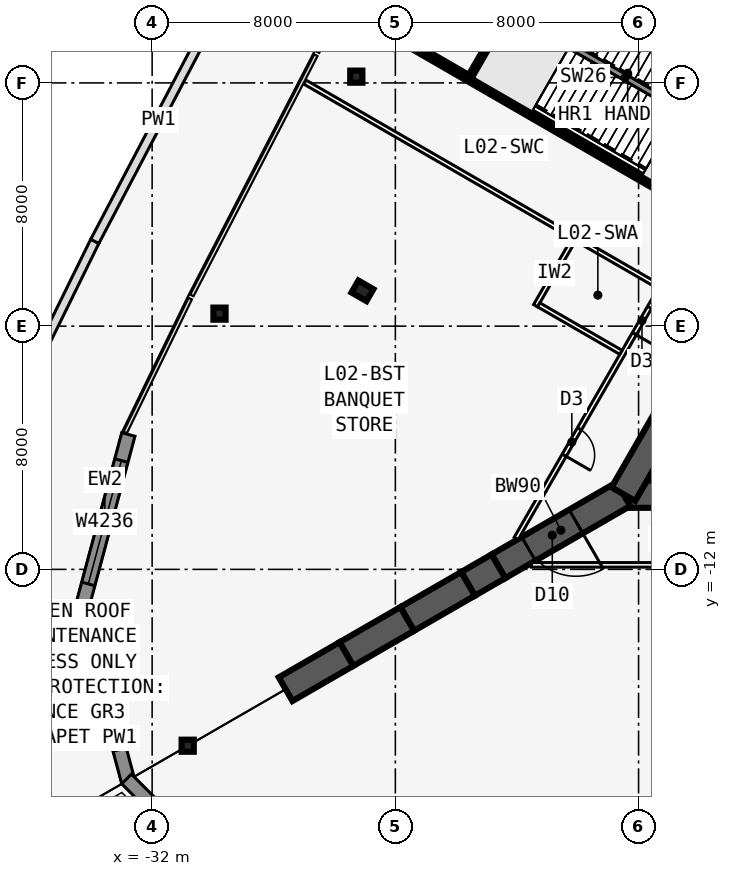
"""IFC4 building model, lengths in metres.
Left out: names, types, materials, properties, quantities, classifications, styles, units other than length and angle.
Written with IfcOpenShell. Run it as: python <this file> out.ifc"""

import sys

from ifc_helpers import new_model, si_unit, direction, frame, frame_2d, origin, origin_2d, place, context, subcontext, project, spatial, rectangle, i_section, extrude, element, fill, save


model = new_model("IFC4")
c1 = context("Model", 3, precision=1e-05, world=origin(), true_north=direction((0.0, 1.0)))
c2 = subcontext(c1, "Body", "Model", "MODEL_VIEW")
j1 = project(units=[si_unit("LENGTHUNIT", "METRE"), si_unit("PLANEANGLEUNIT", "RADIAN")], contexts=[c1])
p1 = place(None, origin())
s1 = spatial("IfcSite", under=j1, at=p1, CompositionType="ELEMENT")
p2 = place(p1, origin())
s2 = spatial("IfcBuilding", under=s1, at=p2, CompositionType="ELEMENT")
p3 = place(p2, frame((0.0, 0.0, 11.0)))
s3 = spatial("IfcBuildingStorey", under=s2, at=p3, CompositionType="ELEMENT", Elevation=11.0)
p4 = place(p3, frame((-16.5, -9.526, 0.0), z_axis=(0.0, 0.0, 1.0), x_axis=(1.0, 0.0, 0.0)))
e1 = element("IfcWall", 1, at=p4, inside=s3, PredefinedType="SHEAR", context=c2, shape_type="SweptSolid", body=[
    extrude(rectangle(XDim=33.0, YDim=0.9, at=frame_2d((16.5, 0.0))), origin(), (0.0, 0.0, 1.0), 6.5),
])
p5 = place(p4, frame((14.05, 0.0, 0.0)))
e2 = element("IfcOpeningElement", 2, at=p5, cuts=e1, PredefinedType="OPENING", context=c2, shape_type="SweptSolid", body=[
    extrude(rectangle(XDim=1.8, YDim=2.13, at=frame_2d((0.9, 1.065))), frame((0.0, 0.46, 0.0), z_axis=(0.0, -1.0, 0.0), x_axis=(1.0, 0.0, 0.0)), (0.0, 0.0, 1.0), 0.92),
])
p6 = place(p3, frame((0.0, 19.052, 0.0), z_axis=(0.0, 0.0, 1.0), x_axis=(-0.499999749417, -0.866025548458, 0.0)))
e3 = element("IfcWall", 3, at=p6, inside=s3, PredefinedType="SHEAR", context=c2, shape_type="SweptSolid", body=[
    extrude(rectangle(XDim=33.0, YDim=0.9, at=frame_2d((16.5, 0.0))), origin(), (0.0, 0.0, 1.0), 6.5),
])
p7 = place(p6, frame((14.15, 0.0, 0.0)))
e4 = element("IfcOpeningElement", 4, at=p7, cuts=e3, PredefinedType="OPENING", context=c2, shape_type="SweptSolid", body=[
    extrude(rectangle(XDim=1.8, YDim=2.13, at=frame_2d((0.9, 1.065))), frame((0.0, 0.46, 0.0), z_axis=(0.0, -1.0, 0.0), x_axis=(1.0, 0.0, 0.0)), (0.0, 0.0, 1.0), 0.92),
])
p8 = place(p6, frame((12.6, 0.0, 0.0)))
e5 = element("IfcOpeningElement", 5, at=p8, cuts=e3, PredefinedType="OPENING", context=c2, shape_type="SweptSolid", body=[
    extrude(rectangle(XDim=1.0, YDim=2.13, at=frame_2d((0.5, 1.065))), frame((0.0, 0.46, 0.0), z_axis=(0.0, -1.0, 0.0), x_axis=(1.0, 0.0, 0.0)), (0.0, 0.0, 1.0), 0.92),
])
p9 = place(p3, frame((-16.5, -9.526, 0.0), z_axis=(0.0, 0.0, 1.0), x_axis=(-0.866031398331, -0.499989616998, 0.0)))
e6 = element("IfcWall", 6, at=p9, inside=s3, PredefinedType="SHEAR", context=c2, shape_type="SweptSolid", body=[
    extrude(rectangle(XDim=4.746, YDim=0.9, at=frame_2d((2.373, 0.0))), origin(), (0.0, 0.0, 1.0), 6.5),
])
p10 = place(p9, frame((1.8, 0.0, 0.0)))
e7 = element("IfcOpeningElement", 7, at=p10, cuts=e6, PredefinedType="OPENING", context=c2, shape_type="SweptSolid", body=[
    extrude(rectangle(XDim=1.8, YDim=2.13, at=frame_2d((0.9, 1.065))), frame((0.0, 0.46, 0.0), z_axis=(0.0, -1.0, 0.0), x_axis=(1.0, 0.0, 0.0)), (0.0, 0.0, 1.0), 0.92),
])
p11 = place(p3, frame((-20.61, -11.899, 0.0), z_axis=(0.0, 0.0, 1.0), x_axis=(-0.866009537788, -0.500027479704, 0.0)))
e8 = element("IfcWall", 8, at=p11, inside=s3, PredefinedType="SHEAR", context=c2, shape_type="SweptSolid", body=[
    extrude(rectangle(XDim=1.155, YDim=0.9, at=frame_2d((0.577, 0.0))), origin(), (0.0, 0.0, 1.0), 6.5),
])
for number, where, z_axis, x_axis in (
    (9, (-21.61, -12.477, 0.0), (0.0, 0.0, 1.0), (-0.866, -0.5, 0.0)),
    (10, (-23.61, -13.631, 0.0), (0.0, 0.0, 1.0), (-0.866, -0.5, 0.0)),
    (11, (-25.61, -14.786, 0.0), (0.0, 0.0, 1.0), (-0.866, -0.5, 0.0)),
):
    element("IfcWall", number, at=place(p3, frame(where, z_axis=z_axis, x_axis=x_axis)), inside=s3, PredefinedType="SHEAR", context=c2, shape_type="SweptSolid", body=[
        extrude(rectangle(XDim=2.309, YDim=0.9, at=frame_2d((1.155, 0.0))), origin(), (0.0, 0.0, 1.0), 6.5),
    ])
p12 = place(p3, frame((-25.083, -2.839, 0.0), z_axis=(0.0, 0.0, 1.0), x_axis=(-0.5, -0.866025403784, 0.0)))
e12 = element("IfcColumn", 12, at=p12, inside=s3, PredefinedType="COLUMN", context=c2, shape_type="SweptSolid", body=[
    extrude(i_section(OverallWidth=0.455, OverallDepth=0.569, WebThickness=0.078, FlangeThickness=0.125, at=origin_2d()), origin(), (0.0, 0.0, 1.0), 6.5),
])
for number, where, z_axis, x_axis in (
    (13, (-30.831, -17.8, 0.0), (0.0, 0.0, 1.0), (1.0, 0.0, 0.0)),
    (14, (-29.785, -3.588, 0.0), (0.0, 0.0, 1.0), (1.0, 0.0, 0.0)),
    (15, (-25.285, 4.206, 0.0), (0.0, 0.0, 1.0), (1.0, 0.0, 0.0)),
):
    element("IfcColumn", number, at=place(p3, frame(where, z_axis=z_axis, x_axis=x_axis)), inside=s3, PredefinedType="COLUMN", context=c2, shape_type="SweptSolid", body=[
        extrude(i_section(OverallWidth=0.401, OverallDepth=0.399, WebThickness=0.025, FlangeThickness=0.04, at=origin_2d()), origin(), (0.0, 0.0, 1.0), 6.5),
    ])
p13 = place(p3, frame((-32.783, -7.564, 0.0), z_axis=(0.0, 0.0, 1.0), x_axis=(-0.258791208569, -0.965933284636, 0.0)))
e16 = element("IfcWall", 16, at=p13, inside=s3, PredefinedType="SOLIDWALL", context=c2, shape_type="SweptSolid", body=[
    extrude(rectangle(XDim=5.977, YDim=0.45, at=frame_2d((2.989, 0.0))), origin(), (0.0, 0.0, 1.0), 6.25),
])
p14 = place(p13, frame((0.889, 0.0, 1.2)))
e17 = element("IfcOpeningElement", 17, at=p14, cuts=e16, PredefinedType="OPENING", context=c2, shape_type="SweptSolid", body=[
    extrude(rectangle(XDim=4.2, YDim=3.6, at=frame_2d((2.1, 1.8))), frame((0.0, 0.235, 0.0), z_axis=(0.0, -1.0, 0.0), x_axis=(1.0, 0.0, 0.0)), (0.0, 0.0, 1.0), 0.47),
])
p15 = place(p3, frame((-34.33, -13.221, 0.0), z_axis=(0.0, 0.0, 1.0), x_axis=(0.258801419081, -0.965930548995, 0.0)))
e18 = element("IfcWall", 18, at=p15, inside=s3, PredefinedType="SOLIDWALL", context=c2, shape_type="SweptSolid", body=[
    extrude(rectangle(XDim=5.977, YDim=0.45, at=frame_2d((2.989, 0.0))), origin(), (0.0, 0.0, 1.0), 6.25),
])
p16 = place(p15, frame((0.67, 0.0, 1.2)))
e19 = element("IfcOpeningElement", 19, at=p16, cuts=e18, PredefinedType="OPENING", context=c2, shape_type="SweptSolid", body=[
    extrude(rectangle(XDim=4.2, YDim=3.6, at=frame_2d((2.1, 1.8))), frame((0.0, 0.235, 0.0), z_axis=(0.0, -1.0, 0.0), x_axis=(1.0, 0.0, 0.0)), (0.0, 0.0, 1.0), 0.47),
])
p17 = place(p3, frame((-32.841, -18.894, 0.0), z_axis=(0.0, 0.0, 1.0), x_axis=(0.707086357855, -0.707127203928, 0.0)))
e20 = element("IfcWall", 20, at=p17, inside=s3, PredefinedType="SOLIDWALL", context=c2, shape_type="SweptSolid", body=[
    extrude(rectangle(XDim=5.977, YDim=0.45, at=frame_2d((2.989, 0.0))), origin(), (0.0, 0.0, 1.0), 6.25),
])
p18 = place(p17, frame((1.107, 0.0, 1.2)))
e21 = element("IfcOpeningElement", 21, at=p18, cuts=e20, PredefinedType="OPENING", context=c2, shape_type="SweptSolid", body=[
    extrude(rectangle(XDim=4.2, YDim=3.6, at=frame_2d((2.1, 1.8))), frame((0.0, 0.235, 0.0), z_axis=(0.0, -1.0, 0.0), x_axis=(1.0, 0.0, 0.0)), (0.0, 0.0, 1.0), 0.47),
])
p19 = place(p3, frame((-37.859, -9.291, 0.0), z_axis=(0.0, 0.0, 1.0), x_axis=(0.441281352702, 0.897368802532, 0.0)))
e22 = element("IfcWall", 22, at=p19, inside=s3, PredefinedType="PARAPET", context=c2, shape_type="SweptSolid", body=[
    extrude(rectangle(XDim=9.003, YDim=0.3, at=frame_2d((4.501, 0.0))), origin(), (0.0, 0.0, 1.0), 1.1),
])
p20 = place(p3, frame((-33.886, -1.211, 0.0), z_axis=(0.0, 0.0, 1.0), x_axis=(0.46498853792, 0.885316700172, 0.0)))
e23 = element("IfcWall", 23, at=p20, inside=s3, PredefinedType="PARAPET", context=c2, shape_type="SweptSolid", body=[
    extrude(rectangle(XDim=9.003, YDim=0.3, at=frame_2d((4.502, 0.0))), origin(), (0.0, 0.0, 1.0), 1.1),
])
p21 = place(p3, frame((-19.527, -11.851, 0.0), z_axis=(0.0, 0.0, 1.0), x_axis=(1.0, 0.0, 0.0)))
e24 = element("IfcWall", 24, at=p21, inside=s3, PredefinedType="PARTITIONING", context=c2, shape_type="SweptSolid", body=[
    extrude(rectangle(XDim=39.054, YDim=0.15, at=frame_2d((19.527, 0.0))), origin(), (0.0, 0.0, 1.0), 5.308),
])
p22 = place(p21, frame((10.013, 0.0, 0.0)))
e25 = element("IfcOpeningElement", 25, at=p22, cuts=e24, PredefinedType="OPENING", context=c2, shape_type="SweptSolid", body=[
    extrude(rectangle(XDim=1.8, YDim=2.13, at=frame_2d((0.9, 1.065))), frame((0.0, 0.085, 0.0), z_axis=(0.0, -1.0, 0.0), x_axis=(1.0, 0.0, 0.0)), (0.0, 0.0, 1.0), 0.17),
])
p23 = place(p21, frame((23.227, 0.0, 0.0)))
e26 = element("IfcOpeningElement", 26, at=p23, cuts=e24, PredefinedType="OPENING", context=c2, shape_type="SweptSolid", body=[
    extrude(rectangle(XDim=1.8, YDim=2.13, at=frame_2d((0.9, 1.065))), frame((0.0, 0.085, 0.0), z_axis=(0.0, -1.0, 0.0), x_axis=(1.0, 0.0, 0.0)), (0.0, 0.0, 1.0), 0.17),
])
p24 = place(p21, frame((31.841, 0.0, 0.0)))
e27 = element("IfcOpeningElement", 27, at=p24, cuts=e24, PredefinedType="OPENING", context=c2, shape_type="SweptSolid", body=[
    extrude(rectangle(XDim=1.8, YDim=2.13, at=frame_2d((0.9, 1.065))), frame((0.0, 0.085, 0.0), z_axis=(0.0, -1.0, 0.0), x_axis=(1.0, 0.0, 0.0)), (0.0, 0.0, 1.0), 0.17),
])
p25 = place(p3, frame((-0.5, 22.836, 0.0), z_axis=(0.0, 0.0, 1.0), x_axis=(-0.500001677587, -0.866024435227, 0.0)))
e28 = element("IfcWall", 28, at=p25, inside=s3, PredefinedType="PARTITIONING", context=c2, shape_type="SweptSolid", body=[
    extrude(rectangle(XDim=39.054, YDim=0.15, at=frame_2d((19.527, 0.0))), origin(), (0.0, 0.0, 1.0), 5.308),
])
p26 = place(p25, frame((10.013, 0.0, 0.0)))
e29 = element("IfcOpeningElement", 29, at=p26, cuts=e28, PredefinedType="OPENING", context=c2, shape_type="SweptSolid", body=[
    extrude(rectangle(XDim=1.8, YDim=2.13, at=frame_2d((0.9, 1.065))), frame((0.0, 0.085, 0.0), z_axis=(0.0, -1.0, 0.0), x_axis=(1.0, 0.0, 0.0)), (0.0, 0.0, 1.0), 0.17),
])
p27 = place(p25, frame((23.227, 0.0, 0.0)))
e30 = element("IfcOpeningElement", 30, at=p27, cuts=e28, PredefinedType="OPENING", context=c2, shape_type="SweptSolid", body=[
    extrude(rectangle(XDim=1.8, YDim=2.13, at=frame_2d((0.9, 1.065))), frame((0.0, 0.085, 0.0), z_axis=(0.0, -1.0, 0.0), x_axis=(1.0, 0.0, 0.0)), (0.0, 0.0, 1.0), 0.17),
])
p28 = place(p25, frame((27.627, 0.0, 0.0)))
e31 = element("IfcOpeningElement", 31, at=p28, cuts=e28, PredefinedType="OPENING", context=c2, shape_type="SweptSolid", body=[
    extrude(rectangle(XDim=1.0, YDim=2.13, at=frame_2d((0.5, 1.065))), frame((0.0, 0.085, 0.0), z_axis=(0.0, -1.0, 0.0), x_axis=(1.0, 0.0, 0.0)), (0.0, 0.0, 1.0), 0.17),
])
p29 = place(p25, frame((30.277, 0.0, 0.0)))
e32 = element("IfcOpeningElement", 32, at=p29, cuts=e28, PredefinedType="OPENING", context=c2, shape_type="SweptSolid", body=[
    extrude(rectangle(XDim=1.0, YDim=2.13, at=frame_2d((0.5, 1.065))), frame((0.0, 0.085, 0.0), z_axis=(0.0, -1.0, 0.0), x_axis=(1.0, 0.0, 0.0)), (0.0, 0.0, 1.0), 0.17),
])
p30 = place(p25, frame((34.89, 0.0, 0.0)))
e33 = element("IfcOpeningElement", 33, at=p30, cuts=e28, PredefinedType="OPENING", context=c2, shape_type="SweptSolid", body=[
    extrude(rectangle(XDim=1.0, YDim=2.13, at=frame_2d((0.5, 1.065))), frame((0.0, 0.085, 0.0), z_axis=(0.0, -1.0, 0.0), x_axis=(1.0, 0.0, 0.0)), (0.0, 0.0, 1.0), 0.17),
])
p31 = place(p3, frame((-11.329, 4.231, 0.0), z_axis=(0.0, 0.0, 1.0), x_axis=(-0.866029620801, 0.499992695841, 0.0)))
e34 = element("IfcWall", 34, at=p31, inside=s3, PredefinedType="SHEAR", context=c2, shape_type="SweptSolid", body=[
    extrude(rectangle(XDim=13.607, YDim=0.2, at=frame_2d((6.804, 0.0))), origin(), (0.0, 0.0, 1.0), 6.5),
])
p32 = place(p3, frame((-13.928, -0.272, 0.0), z_axis=(0.0, 0.0, 1.0), x_axis=(-0.866022969634, 0.500004216049, 0.0)))
e35 = element("IfcWall", 35, at=p32, inside=s3, PredefinedType="SHEAR", context=c2, shape_type="SweptSolid", body=[
    extrude(rectangle(XDim=13.526, YDim=0.2, at=frame_2d((6.763, 0.0))), origin(), (0.0, 0.0, 1.0), 6.5),
])
p33 = place(p3, frame((-15.329, -2.697, 0.0), z_axis=(0.0, 0.0, 1.0), x_axis=(-0.866024753221, 0.500001126807, 0.0)))
e36 = element("IfcWall", 36, at=p33, inside=s3, PredefinedType="PARTITIONING", context=c2, shape_type="SweptSolid", body=[
    extrude(rectangle(XDim=13.448, YDim=0.15, at=frame_2d((6.724, 0.0))), origin(), (0.0, 0.0, 1.0), 5.308),
])
p34 = place(p3, frame((-18.137, -1.162, 0.0), z_axis=(0.0, 0.0, 1.0), x_axis=(-0.500004234368, -0.866022959057, 0.0)))
e37 = element("IfcWall", 37, at=p34, inside=s3, PredefinedType="PARTITIONING", context=c2, shape_type="SweptSolid", body=[
    extrude(rectangle(XDim=2.5, YDim=0.15, at=frame_2d((1.25, 0.0))), origin(), (0.0, 0.0, 1.0), 6.25),
])
p35 = place(p3, frame((-16.579, -4.862, 0.0), z_axis=(0.0, 0.0, 1.0), x_axis=(-0.866022959057, 0.500004234368, 0.0)))
e38 = element("IfcWall", 38, at=p35, inside=s3, PredefinedType="PARTITIONING", context=c2, shape_type="SweptSolid", body=[
    extrude(rectangle(XDim=3.125, YDim=0.15, at=frame_2d((1.562, 0.0))), origin(), (0.0, 0.0, 1.0), 6.25),
])
p36 = place(p3, frame((-18.949, 8.631, 0.0), z_axis=(0.0, 0.0, 1.0), x_axis=(-0.500006934395, -0.866021400173, 0.0)))
e39 = element("IfcWall", 39, at=p36, inside=s3, PredefinedType="SHEAR", context=c2, shape_type="SweptSolid", body=[
    extrude(rectangle(XDim=5.2, YDim=0.2, at=frame_2d((2.6, 0.0))), origin(), (0.0, 0.0, 1.0), 6.5),
])
p37 = place(p3, frame((-14.623, 3.131, 0.0), z_axis=(0.0, 0.0, 1.0), x_axis=(-0.866031452229, 0.49998952364, 0.0)))
e40 = element("IfcWall", 40, at=p37, inside=s3, PredefinedType="SOLIDWALL", context=c2, shape_type="SweptSolid", body=[
    extrude(rectangle(XDim=4.194, YDim=0.2, at=frame_2d((2.097, 0.0))), origin(), (0.0, 0.0, 1.0), 6.5),
])
p38 = place(p14, origin())
e41 = element("IfcWindow", 41, at=p38, inside=s3, PartitioningType="SINGLE_PANEL", PredefinedType="WINDOW", context=c2, shape_type="SweptSolid", body=[
    extrude(rectangle(XDim=4.2, YDim=3.6, at=frame_2d((2.1, 1.8))), frame((0.0, 0.03, 0.0), z_axis=(0.0, -1.0, 0.0), x_axis=(1.0, 0.0, 0.0)), (0.0, 0.0, 1.0), 0.06),
])
fill(e17, e41)
p39 = place(p16, origin())
e42 = element("IfcWindow", 42, at=p39, inside=s3, PartitioningType="SINGLE_PANEL", PredefinedType="WINDOW", context=c2, shape_type="SweptSolid", body=[
    extrude(rectangle(XDim=4.2, YDim=3.6, at=frame_2d((2.1, 1.8))), frame((0.0, 0.03, 0.0), z_axis=(0.0, -1.0, 0.0), x_axis=(1.0, 0.0, 0.0)), (0.0, 0.0, 1.0), 0.06),
])
fill(e19, e42)
p40 = place(p29, origin())
e43 = element("IfcDoor", 43, at=p40, inside=s3, OperationType="SINGLE_SWING_RIGHT", PredefinedType="DOOR", context=c2, shape_type="SweptSolid", body=[
    extrude(rectangle(XDim=1.0, YDim=2.13, at=frame_2d((0.5, 1.065))), frame((0.0, 0.025, 0.0), z_axis=(0.0, -1.0, 0.0), x_axis=(1.0, 0.0, 0.0)), (0.0, 0.0, 1.0), 0.05),
])
fill(e32, e43)
p41 = place(p30, origin())
e44 = element("IfcDoor", 44, at=p41, inside=s3, OperationType="SINGLE_SWING_RIGHT", PredefinedType="DOOR", context=c2, shape_type="SweptSolid", body=[
    extrude(rectangle(XDim=1.0, YDim=2.13, at=frame_2d((0.5, 1.065))), frame((0.0, 0.025, 0.0), z_axis=(0.0, -1.0, 0.0), x_axis=(1.0, 0.0, 0.0)), (0.0, 0.0, 1.0), 0.05),
])
fill(e33, e44)
p42 = place(p10, origin())
e45 = element("IfcDoor", 45, at=p42, inside=s3, OperationType="DOUBLE_DOOR_DOUBLE_SWING", PredefinedType="DOOR", context=c2, shape_type="SweptSolid", body=[
    extrude(rectangle(XDim=1.8, YDim=2.13, at=frame_2d((0.9, 1.065))), frame((0.0, 0.025, 0.0), z_axis=(0.0, -1.0, 0.0), x_axis=(1.0, 0.0, 0.0)), (0.0, 0.0, 1.0), 0.05),
])
fill(e7, e45)
save(model, sys.argv[1])
